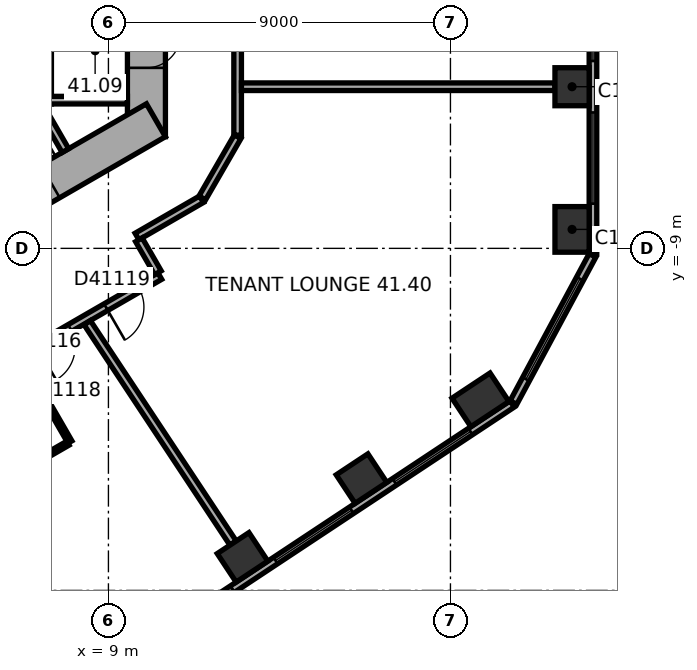
"""IFC4 building model, lengths in metres.
Left out: names, types, materials, properties, quantities, classifications, styles, units other than length and angle.
Written with IfcOpenShell. Run it as: python <this file> out.ifc"""

import sys

from ifc_helpers import new_model, si_unit, direction, frame, frame_2d, origin, origin_2d, place, context, subcontext, project, spatial, rectangle, extrude, element, fill, save


model = new_model("IFC4")
c1 = context("Model", 3, precision=1e-05, world=origin(), true_north=direction((0.0, 1.0)))
c2 = subcontext(c1, "Body", "Model", "MODEL_VIEW")
j1 = project(units=[si_unit("LENGTHUNIT", "METRE"), si_unit("PLANEANGLEUNIT", "RADIAN")], contexts=[c1])
p1 = place(None, origin())
s1 = spatial("IfcSite", under=j1, at=p1, CompositionType="ELEMENT")
p2 = place(p1, origin())
s2 = spatial("IfcBuilding", under=s1, at=p2, CompositionType="ELEMENT")
p3 = place(p2, frame((0.0, 0.0, 168.8)))
s3 = spatial("IfcBuildingStorey", under=s2, at=p3, CompositionType="ELEMENT", Elevation=168.8)
p4 = place(p3, frame((21.2, -8.501, 0.0), z_axis=(0.0, 0.0, 1.0), x_axis=(0.0, 1.0, 0.0)))
e1 = element("IfcColumn", 1, at=p4, inside=s3, PredefinedType="COLUMN", context=c2, shape_type="SweptSolid", body=[
    extrude(rectangle(XDim=1.2, YDim=0.9, at=origin_2d()), origin(), (0.0, 0.0, 1.0), 3.7),
])
for number, where, z_axis, x_axis in (
    (2, (21.2, -4.747, 0.0), (0.0, 0.0, 1.0), (0.0, 1.0, 0.0)),
    (3, (12.529, -17.13, 0.0), (0.0, 0.0, 1.0), (0.834, 0.552, 0.0)),
    (4, (15.659, -15.058, 0.0), (0.0, 0.0, 1.0), (0.834, 0.552, 0.0)),
):
    element("IfcColumn", number, at=place(p3, frame(where, z_axis=z_axis, x_axis=x_axis)), inside=s3, PredefinedType="COLUMN", context=c2, shape_type="SweptSolid", body=[
        extrude(rectangle(XDim=1.0, YDim=0.9, at=origin_2d()), origin(), (0.0, 0.0, 1.0), 3.7),
    ])
p5 = place(p3, frame((18.79, -12.986, 0.0), z_axis=(0.0, 0.0, 1.0), x_axis=(0.833885822067, 0.551936985312, 0.0)))
e5 = element("IfcColumn", 5, at=p5, inside=s3, PredefinedType="COLUMN", context=c2, shape_type="SweptSolid", body=[
    extrude(rectangle(XDim=1.2, YDim=0.9, at=origin_2d()), origin(), (0.0, 0.0, 1.0), 3.7),
])
p6 = place(p3, frame((10.0, -6.062, 0.0), z_axis=(0.0, 0.0, 1.0), x_axis=(0.0, 1.0, 0.0)))
e6 = element("IfcWall", 6, at=p6, inside=s3, PredefinedType="SHEAR", context=c2, shape_type="SweptSolid", body=[
    extrude(rectangle(XDim=12.125, YDim=1.0, at=frame_2d((6.062, 0.0))), origin(), (0.0, 0.0, 1.0), 3.7),
])
p7 = place(p6, frame((6.262, 0.0, 0.0)))
e7 = element("IfcOpeningElement", 7, at=p7, cuts=e6, PredefinedType="OPENING", context=c2, shape_type="SweptSolid", body=[
    extrude(rectangle(XDim=1.5, YDim=2.1, at=frame_2d((0.75, 1.05))), frame((0.0, 0.51, 0.0), z_axis=(0.0, -1.0, 0.0), x_axis=(1.0, 0.0, 0.0)), (0.0, 0.0, 1.0), 1.02),
])
p8 = place(p6, frame((1.812, 0.0, 0.0)))
e8 = element("IfcOpeningElement", 8, at=p8, cuts=e6, PredefinedType="OPENING", context=c2, shape_type="SweptSolid", body=[
    extrude(rectangle(XDim=0.9, YDim=2.1, at=frame_2d((0.45, 1.05))), frame((0.0, 0.51, 0.0), z_axis=(0.0, -1.0, 0.0), x_axis=(1.0, 0.0, 0.0)), (0.0, 0.0, 1.0), 1.02),
])
p9 = place(p6, frame((4.412, 0.0, 0.0)))
e9 = element("IfcOpeningElement", 9, at=p9, cuts=e6, PredefinedType="OPENING", context=c2, shape_type="SweptSolid", body=[
    extrude(rectangle(XDim=0.9, YDim=2.1, at=frame_2d((0.45, 1.05))), frame((0.0, 0.51, 0.0), z_axis=(0.0, -1.0, 0.0), x_axis=(1.0, 0.0, 0.0)), (0.0, 0.0, 1.0), 1.02),
])
p10 = place(p3, frame((-0.25, -11.691, 0.0), z_axis=(0.0, 0.0, 1.0), x_axis=(0.866022616891, 0.50000482701, 0.0)))
e10 = element("IfcWall", 10, at=p10, inside=s3, PredefinedType="SHEAR", context=c2, shape_type="SweptSolid", body=[
    extrude(rectangle(XDim=12.125, YDim=1.0, at=frame_2d((6.062, 0.0))), origin(), (0.0, 0.0, 1.0), 3.7),
])
p11 = place(p10, frame((2.612, 0.0, 0.0)))
e11 = element("IfcOpeningElement", 11, at=p11, cuts=e10, PredefinedType="OPENING", context=c2, shape_type="SweptSolid", body=[
    extrude(rectangle(XDim=1.1, YDim=2.1, at=frame_2d((0.55, 1.05))), frame((0.0, 0.51, 0.0), z_axis=(0.0, -1.0, 0.0), x_axis=(1.0, 0.0, 0.0)), (0.0, 0.0, 1.0), 1.02),
])
p12 = place(p10, frame((5.212, 0.0, 0.0)))
e12 = element("IfcOpeningElement", 12, at=p12, cuts=e10, PredefinedType="OPENING", context=c2, shape_type="SweptSolid", body=[
    extrude(rectangle(XDim=1.1, YDim=2.1, at=frame_2d((0.55, 1.05))), frame((0.0, 0.51, 0.0), z_axis=(0.0, -1.0, 0.0), x_axis=(1.0, 0.0, 0.0)), (0.0, 0.0, 1.0), 1.02),
])
p13 = place(p10, frame((7.812, 0.0, 0.0)))
e13 = element("IfcOpeningElement", 13, at=p13, cuts=e10, PredefinedType="OPENING", context=c2, shape_type="SweptSolid", body=[
    extrude(rectangle(XDim=1.1, YDim=2.1, at=frame_2d((0.55, 1.05))), frame((0.0, 0.51, 0.0), z_axis=(0.0, -1.0, 0.0), x_axis=(1.0, 0.0, 0.0)), (0.0, 0.0, 1.0), 1.02),
])
p14 = place(p3, frame((21.75, -9.138, 0.0), z_axis=(0.0, 0.0, 1.0), x_axis=(0.0, 1.0, 0.0)))
e14 = element("IfcWall", 14, at=p14, inside=s3, PredefinedType="STANDARD", context=c2, shape_type="SweptSolid", body=[
    extrude(rectangle(XDim=20.044, YDim=0.2, at=frame_2d((10.022, 0.0))), origin(), (0.0, 0.0, 1.0), 3.7),
])
p15 = place(p14, frame((1.314, 0.0, 0.9)))
e15 = element("IfcOpeningElement", 15, at=p15, cuts=e14, PredefinedType="OPENING", context=c2, shape_type="SweptSolid", body=[
    extrude(rectangle(XDim=2.4, YDim=2.0, at=frame_2d((1.2, 1.0))), frame((0.0, 0.11, 0.0), z_axis=(0.0, -1.0, 0.0), x_axis=(1.0, 0.0, 0.0)), (0.0, 0.0, 1.0), 0.22),
])
p16 = place(p14, frame((5.069, 0.0, 0.9)))
e16 = element("IfcOpeningElement", 16, at=p16, cuts=e14, PredefinedType="OPENING", context=c2, shape_type="SweptSolid", body=[
    extrude(rectangle(XDim=2.4, YDim=2.0, at=frame_2d((1.2, 1.0))), frame((0.0, 0.11, 0.0), z_axis=(0.0, -1.0, 0.0), x_axis=(1.0, 0.0, 0.0)), (0.0, 0.0, 1.0), 0.22),
])
p17 = place(p14, frame((8.823, 0.0, 0.9)))
e17 = element("IfcOpeningElement", 17, at=p17, cuts=e14, PredefinedType="OPENING", context=c2, shape_type="SweptSolid", body=[
    extrude(rectangle(XDim=2.4, YDim=2.0, at=frame_2d((1.2, 1.0))), frame((0.0, 0.11, 0.0), z_axis=(0.0, -1.0, 0.0), x_axis=(1.0, 0.0, 0.0)), (0.0, 0.0, 1.0), 0.22),
])
p18 = place(p14, frame((12.577, 0.0, 0.9)))
e18 = element("IfcOpeningElement", 18, at=p18, cuts=e14, PredefinedType="OPENING", context=c2, shape_type="SweptSolid", body=[
    extrude(rectangle(XDim=2.4, YDim=2.0, at=frame_2d((1.2, 1.0))), frame((0.0, 0.11, 0.0), z_axis=(0.0, -1.0, 0.0), x_axis=(1.0, 0.0, 0.0)), (0.0, 0.0, 1.0), 0.22),
])
p19 = place(p14, frame((16.331, 0.0, 0.9)))
e19 = element("IfcOpeningElement", 19, at=p19, cuts=e14, PredefinedType="OPENING", context=c2, shape_type="SweptSolid", body=[
    extrude(rectangle(XDim=2.4, YDim=2.0, at=frame_2d((1.2, 1.0))), frame((0.0, 0.11, 0.0), z_axis=(0.0, -1.0, 0.0), x_axis=(1.0, 0.0, 0.0)), (0.0, 0.0, 1.0), 0.22),
])
p20 = place(p3, frame((2.911, -24.156, 0.0), z_axis=(0.0, 0.0, 1.0), x_axis=(0.833882163564, 0.551942512668, 0.0)))
e20 = element("IfcWall", 20, at=p20, inside=s3, PredefinedType="STANDARD", context=c2, shape_type="SweptSolid", body=[
    extrude(rectangle(XDim=20.044, YDim=0.2, at=frame_2d((10.022, 0.0))), origin(), (0.0, 0.0, 1.0), 3.7),
])
p21 = place(p20, frame((1.313, 0.0, 0.9)))
e21 = element("IfcOpeningElement", 21, at=p21, cuts=e20, PredefinedType="OPENING", context=c2, shape_type="SweptSolid", body=[
    extrude(rectangle(XDim=2.4, YDim=2.0, at=frame_2d((1.2, 1.0))), frame((0.0, 0.11, 0.0), z_axis=(0.0, -1.0, 0.0), x_axis=(1.0, 0.0, 0.0)), (0.0, 0.0, 1.0), 0.22),
])
p22 = place(p20, frame((5.067, 0.0, 0.9)))
e22 = element("IfcOpeningElement", 22, at=p22, cuts=e20, PredefinedType="OPENING", context=c2, shape_type="SweptSolid", body=[
    extrude(rectangle(XDim=2.4, YDim=2.0, at=frame_2d((1.2, 1.0))), frame((0.0, 0.11, 0.0), z_axis=(0.0, -1.0, 0.0), x_axis=(1.0, 0.0, 0.0)), (0.0, 0.0, 1.0), 0.22),
])
p23 = place(p20, frame((8.821, 0.0, 0.9)))
e23 = element("IfcOpeningElement", 23, at=p23, cuts=e20, PredefinedType="OPENING", context=c2, shape_type="SweptSolid", body=[
    extrude(rectangle(XDim=2.4, YDim=2.0, at=frame_2d((1.2, 1.0))), frame((0.0, 0.11, 0.0), z_axis=(0.0, -1.0, 0.0), x_axis=(1.0, 0.0, 0.0)), (0.0, 0.0, 1.0), 0.22),
])
p24 = place(p20, frame((12.575, 0.0, 0.9)))
e24 = element("IfcOpeningElement", 24, at=p24, cuts=e20, PredefinedType="OPENING", context=c2, shape_type="SweptSolid", body=[
    extrude(rectangle(XDim=2.4, YDim=2.0, at=frame_2d((1.2, 1.0))), frame((0.0, 0.11, 0.0), z_axis=(0.0, -1.0, 0.0), x_axis=(1.0, 0.0, 0.0)), (0.0, 0.0, 1.0), 0.22),
])
p25 = place(p20, frame((16.329, 0.0, 0.9)))
e25 = element("IfcOpeningElement", 25, at=p25, cuts=e20, PredefinedType="OPENING", context=c2, shape_type="SweptSolid", body=[
    extrude(rectangle(XDim=2.4, YDim=2.0, at=frame_2d((1.2, 1.0))), frame((0.0, 0.11, 0.0), z_axis=(0.0, -1.0, 0.0), x_axis=(1.0, 0.0, 0.0)), (0.0, 0.0, 1.0), 0.22),
])
p26 = place(p3, frame((19.658, -13.057, 0.0), z_axis=(0.0, 0.0, 1.0), x_axis=(0.473307879841, 0.880897071672, 0.0)))
e26 = element("IfcWall", 26, at=p26, inside=s3, PredefinedType="STANDARD", context=c2, shape_type="SweptSolid", body=[
    extrude(rectangle(XDim=4.395, YDim=0.2, at=frame_2d((2.197, 0.0))), origin(), (0.0, 0.0, 1.0), 3.7),
])
p27 = place(p26, frame((0.698, 0.0, 0.9)))
e27 = element("IfcOpeningElement", 27, at=p27, cuts=e26, PredefinedType="OPENING", context=c2, shape_type="SweptSolid", body=[
    extrude(rectangle(XDim=3.0, YDim=2.0, at=frame_2d((1.5, 1.0))), frame((0.0, 0.11, 0.0), z_axis=(0.0, -1.0, 0.0), x_axis=(1.0, 0.0, 0.0)), (0.0, 0.0, 1.0), 0.22),
])
for number, where, z_axis, x_axis in (
    (28, (7.3, -5.1, 0.0), (0.0, 0.0, 1.0), (1.0, 0.0, 0.0)),
    (29, (6.768, -4.522, 0.0), (0.0, 0.0, 1.0), (0.5, -0.866, 0.0)),
):
    element("IfcWall", number, at=place(p3, frame(where, z_axis=z_axis, x_axis=x_axis)), inside=s3, PredefinedType="PARTITIONING", context=c2, shape_type="SweptSolid", body=[
        extrude(rectangle(XDim=2.2, YDim=0.2, at=frame_2d((1.1, 0.0))), origin(), (0.0, 0.0, 1.0), 3.42),
    ])
p28 = place(p3, frame((4.782, -12.944, 0.0), z_axis=(0.0, 0.0, 1.0), x_axis=(0.866022506829, 0.50000501764, 0.0)))
e30 = element("IfcWall", 30, at=p28, inside=s3, PredefinedType="PARTITIONING", context=c2, shape_type="SweptSolid", body=[
    extrude(rectangle(XDim=6.432, YDim=0.2, at=frame_2d((3.216, 0.0))), origin(), (0.0, 0.0, 1.0), 3.42),
])
p29 = place(p28, frame((2.704, 0.0, 0.0)))
e31 = element("IfcOpeningElement", 31, at=p29, cuts=e30, PredefinedType="OPENING", context=c2, shape_type="SweptSolid", body=[
    extrude(rectangle(XDim=1.0, YDim=2.1, at=frame_2d((0.5, 1.05))), frame((0.0, 0.11, 0.0), z_axis=(0.0, -1.0, 0.0), x_axis=(1.0, 0.0, 0.0)), (0.0, 0.0, 1.0), 0.22),
])
p30 = place(p28, frame((4.795, 0.0, 0.0)))
e32 = element("IfcOpeningElement", 32, at=p30, cuts=e30, PredefinedType="OPENING", context=c2, shape_type="SweptSolid", body=[
    extrude(rectangle(XDim=1.0, YDim=2.1, at=frame_2d((0.5, 1.05))), frame((0.0, 0.11, 0.0), z_axis=(0.0, -1.0, 0.0), x_axis=(1.0, 0.0, 0.0)), (0.0, 0.0, 1.0), 0.22),
])
p31 = place(p3, frame((6.737, -11.931, 0.0), z_axis=(0.0, 0.0, 1.0), x_axis=(0.500004234368, -0.866022959057, 0.0)))
e33 = element("IfcWall", 33, at=p31, inside=s3, PredefinedType="PARTITIONING", context=c2, shape_type="SweptSolid", body=[
    extrude(rectangle(XDim=2.5, YDim=0.12, at=frame_2d((1.25, 0.0))), origin(), (0.0, 0.0, 1.0), 3.42),
])
p32 = place(p31, frame((0.8, 0.0, 0.0)))
e34 = element("IfcOpeningElement", 34, at=p32, cuts=e33, PredefinedType="OPENING", context=c2, shape_type="SweptSolid", body=[
    extrude(rectangle(XDim=0.9, YDim=2.1, at=frame_2d((0.45, 1.05))), frame((0.0, 0.07, 0.0), z_axis=(0.0, -1.0, 0.0), x_axis=(1.0, 0.0, 0.0)), (0.0, 0.0, 1.0), 0.14),
])
p33 = place(p3, frame((7.935, -14.126, 0.0), z_axis=(0.0, 0.0, 1.0), x_axis=(-0.866009661879, -0.500027264788, 0.0)))
e35 = element("IfcWall", 35, at=p33, inside=s3, PredefinedType="PARTITIONING", context=c2, shape_type="SweptSolid", body=[
    extrude(rectangle(XDim=2.08, YDim=0.12, at=frame_2d((1.04, 0.0))), origin(), (0.0, 0.0, 1.0), 3.42),
])
p34 = place(p3, frame((9.752, -8.688, 0.0), z_axis=(0.0, 0.0, 1.0), x_axis=(0.865974105138, 0.500088841337, 0.0)))
e36 = element("IfcWall", 36, at=p34, inside=s3, PredefinedType="PARTITIONING", context=c2, shape_type="SweptSolid", body=[
    extrude(rectangle(XDim=1.961, YDim=0.2, at=frame_2d((0.98, 0.0))), origin(), (0.0, 0.0, 1.0), 3.42),
])
p35 = place(p3, frame((10.302, -9.642, 0.0), z_axis=(0.0, 0.0, 1.0), x_axis=(-0.500074377092, 0.865982457891, 0.0)))
e37 = element("IfcWall", 37, at=p35, inside=s3, PredefinedType="PARTITIONING", context=c2, shape_type="SweptSolid", body=[
    extrude(rectangle(XDim=1.001, YDim=0.2, at=frame_2d((0.5, 0.0))), origin(), (0.0, 0.0, 1.0), 3.42),
])
p36 = place(p3, frame((11.47, -7.673, 0.0), z_axis=(0.0, 0.0, 1.0), x_axis=(0.499964847546, 0.866045698112, 0.0)))
e38 = element("IfcWall", 38, at=p36, inside=s3, PredefinedType="PARTITIONING", context=c2, shape_type="SweptSolid", body=[
    extrude(rectangle(XDim=1.86, YDim=0.2, at=frame_2d((0.93, 0.0))), origin(), (0.0, 0.0, 1.0), 3.42),
])
p37 = place(p3, frame((12.281, -16.755, 0.0), z_axis=(0.0, 0.0, 1.0), x_axis=(-0.551925794663, 0.833893228888, 0.0)))
e39 = element("IfcWall", 39, at=p37, inside=s3, PredefinedType="PARTITIONING", context=c2, shape_type="SweptSolid", body=[
    extrude(rectangle(XDim=6.953, YDim=0.2, at=frame_2d((3.476, 0.0))), origin(), (0.0, 0.0, 1.0), 3.42),
])
p38 = place(p3, frame((12.4, -6.022, 0.0), z_axis=(0.0, 0.0, 1.0), x_axis=(0.0, 1.0, 0.0)))
e40 = element("IfcWall", 40, at=p38, inside=s3, PredefinedType="PARTITIONING", context=c2, shape_type="SweptSolid", body=[
    extrude(rectangle(XDim=5.029, YDim=0.2, at=frame_2d((2.515, 0.0))), origin(), (0.0, 0.0, 1.0), 3.42),
])
p39 = place(p3, frame((20.75, -4.747, 0.0), z_axis=(0.0, 0.0, 1.0), x_axis=(-1.0, 0.0, 0.0)))
e41 = element("IfcWall", 41, at=p39, inside=s3, PredefinedType="PARTITIONING", context=c2, shape_type="SweptSolid", body=[
    extrude(rectangle(XDim=8.25, YDim=0.2, at=frame_2d((4.125, 0.0))), origin(), (0.0, 0.0, 1.0), 3.42),
])
p40 = place(p15, origin())
e42 = element("IfcWindow", 42, at=p40, inside=s3, PartitioningType="SINGLE_PANEL", PredefinedType="WINDOW", context=c2, shape_type="SweptSolid", body=[
    extrude(rectangle(XDim=2.4, YDim=2.0, at=frame_2d((1.2, 1.0))), frame((0.0, 0.03, 0.0), z_axis=(0.0, -1.0, 0.0), x_axis=(1.0, 0.0, 0.0)), (0.0, 0.0, 1.0), 0.06),
])
fill(e15, e42)
p41 = place(p16, origin())
e43 = element("IfcWindow", 43, at=p41, inside=s3, PartitioningType="SINGLE_PANEL", PredefinedType="WINDOW", context=c2, shape_type="SweptSolid", body=[
    extrude(rectangle(XDim=2.4, YDim=2.0, at=frame_2d((1.2, 1.0))), frame((0.0, 0.03, 0.0), z_axis=(0.0, -1.0, 0.0), x_axis=(1.0, 0.0, 0.0)), (0.0, 0.0, 1.0), 0.06),
])
fill(e16, e43)
p42 = place(p23, origin())
e44 = element("IfcWindow", 44, at=p42, inside=s3, PartitioningType="SINGLE_PANEL", PredefinedType="WINDOW", context=c2, shape_type="SweptSolid", body=[
    extrude(rectangle(XDim=2.4, YDim=2.0, at=frame_2d((1.2, 1.0))), frame((0.0, 0.03, 0.0), z_axis=(0.0, -1.0, 0.0), x_axis=(1.0, 0.0, 0.0)), (0.0, 0.0, 1.0), 0.06),
])
fill(e23, e44)
p43 = place(p24, origin())
e45 = element("IfcWindow", 45, at=p43, inside=s3, PartitioningType="SINGLE_PANEL", PredefinedType="WINDOW", context=c2, shape_type="SweptSolid", body=[
    extrude(rectangle(XDim=2.4, YDim=2.0, at=frame_2d((1.2, 1.0))), frame((0.0, 0.03, 0.0), z_axis=(0.0, -1.0, 0.0), x_axis=(1.0, 0.0, 0.0)), (0.0, 0.0, 1.0), 0.06),
])
fill(e24, e45)
p44 = place(p25, origin())
e46 = element("IfcWindow", 46, at=p44, inside=s3, PartitioningType="SINGLE_PANEL", PredefinedType="WINDOW", context=c2, shape_type="SweptSolid", body=[
    extrude(rectangle(XDim=2.4, YDim=2.0, at=frame_2d((1.2, 1.0))), frame((0.0, 0.03, 0.0), z_axis=(0.0, -1.0, 0.0), x_axis=(1.0, 0.0, 0.0)), (0.0, 0.0, 1.0), 0.06),
])
fill(e25, e46)
p45 = place(p27, origin())
e47 = element("IfcWindow", 47, at=p45, inside=s3, PartitioningType="SINGLE_PANEL", PredefinedType="WINDOW", context=c2, shape_type="SweptSolid", body=[
    extrude(rectangle(XDim=3.0, YDim=2.0, at=frame_2d((1.5, 1.0))), frame((0.0, 0.03, 0.0), z_axis=(0.0, -1.0, 0.0), x_axis=(1.0, 0.0, 0.0)), (0.0, 0.0, 1.0), 0.06),
])
fill(e27, e47)
p46 = place(p8, origin())
e48 = element("IfcDoor", 48, at=p46, inside=s3, OperationType="SINGLE_SWING_LEFT", PredefinedType="DOOR", context=c2, shape_type="SweptSolid", body=[
    extrude(rectangle(XDim=0.9, YDim=2.1, at=frame_2d((0.45, 1.05))), frame((0.0, 0.025, 0.0), z_axis=(0.0, -1.0, 0.0), x_axis=(1.0, 0.0, 0.0)), (0.0, 0.0, 1.0), 0.05),
])
fill(e8, e48)
p47 = place(p29, origin())
e49 = element("IfcDoor", 49, at=p47, inside=s3, OperationType="SINGLE_SWING_LEFT", PredefinedType="DOOR", context=c2, shape_type="SweptSolid", body=[
    extrude(rectangle(XDim=1.0, YDim=2.1, at=frame_2d((0.5, 1.05))), frame((0.0, 0.025, 0.0), z_axis=(0.0, -1.0, 0.0), x_axis=(1.0, 0.0, 0.0)), (0.0, 0.0, 1.0), 0.05),
])
fill(e31, e49)
p48 = place(p32, origin())
e50 = element("IfcDoor", 50, at=p48, inside=s3, OperationType="SINGLE_SWING_LEFT", PredefinedType="DOOR", context=c2, shape_type="SweptSolid", body=[
    extrude(rectangle(XDim=0.9, YDim=2.1, at=frame_2d((0.45, 1.05))), frame((0.0, 0.025, 0.0), z_axis=(0.0, -1.0, 0.0), x_axis=(1.0, 0.0, 0.0)), (0.0, 0.0, 1.0), 0.05),
])
fill(e34, e50)
p49 = place(p30, origin())
e51 = element("IfcDoor", 51, at=p49, inside=s3, OperationType="SINGLE_SWING_LEFT", PredefinedType="DOOR", context=c2, shape_type="SweptSolid", body=[
    extrude(rectangle(XDim=1.0, YDim=2.1, at=frame_2d((0.5, 1.05))), frame((0.0, 0.025, 0.0), z_axis=(0.0, -1.0, 0.0), x_axis=(1.0, 0.0, 0.0)), (0.0, 0.0, 1.0), 0.05),
])
fill(e32, e51)
save(model, sys.argv[1])
